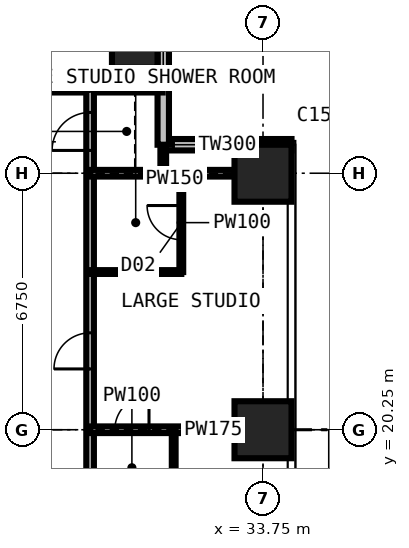
"""IFC4 building model, lengths in metres.
Left out: names, types, materials, properties, quantities, classifications, styles, units other than length and angle.
Written with IfcOpenShell. Run it as: python <this file> out.ifc"""

import sys

from ifc_helpers import new_model, si_unit, direction, frame, frame_2d, origin, origin_2d, place, context, subcontext, project, spatial, rectangle, extrude, element, fill, save


model = new_model("IFC4")
c1 = context("Model", 3, precision=1e-05, world=origin(), true_north=direction((0.0, 1.0)))
c2 = subcontext(c1, "Body", "Model", "MODEL_VIEW")
j1 = project(units=[si_unit("LENGTHUNIT", "METRE"), si_unit("PLANEANGLEUNIT", "RADIAN")], contexts=[c1])
p1 = place(None, origin())
s1 = spatial("IfcSite", under=j1, at=p1, CompositionType="ELEMENT")
p2 = place(p1, origin())
s2 = spatial("IfcBuilding", under=s1, at=p2, CompositionType="ELEMENT")
p3 = place(p2, frame((0.0, 0.0, 153.0)))
s3 = spatial("IfcBuildingStorey", under=s2, at=p3, CompositionType="ELEMENT", Elevation=153.0)
p4 = place(p3, frame((30.375, 30.375, 0.0), z_axis=(0.0, 0.0, 1.0), x_axis=(1.0, 0.0, 0.0)))
e1 = element("IfcColumn", 1, at=p4, inside=s3, PredefinedType="COLUMN", context=c2, shape_type="SweptSolid", body=[
    extrude(rectangle(XDim=1.2, YDim=1.2, at=origin_2d()), origin(), (0.0, 0.0, 1.0), 3.6),
])
for number, where, z_axis, x_axis in (
    (2, (33.75, 20.25, 0.0), (0.0, 0.0, 1.0), (1.0, 0.0, 0.0)),
    (3, (33.75, 27.0, 0.0), (0.0, 0.0, 1.0), (1.0, 0.0, 0.0)),
):
    element("IfcColumn", number, at=place(p3, frame(where, z_axis=z_axis, x_axis=x_axis)), inside=s3, PredefinedType="COLUMN", context=c2, shape_type="SweptSolid", body=[
        extrude(rectangle(XDim=1.5, YDim=1.5, at=origin_2d()), origin(), (0.0, 0.0, 1.0), 3.6),
    ])
p5 = place(p3, frame((34.5, 27.75, 0.0), z_axis=(0.0, 0.0, 1.0), x_axis=(-1.0, 0.0, 0.0)))
e4 = element("IfcWall", 4, at=p5, inside=s3, PredefinedType="SOLIDWALL", context=c2, shape_type="SweptSolid", body=[
    extrude(rectangle(XDim=3.375, YDim=0.3, at=frame_2d((1.688, 0.0))), origin(), (0.0, 0.0, 1.0), 3.375),
])
p6 = place(p5, frame((1.607, 0.0, 0.9)))
e5 = element("IfcOpeningElement", 5, at=p6, cuts=e4, PredefinedType="OPENING", context=c2, shape_type="SweptSolid", body=[
    extrude(rectangle(XDim=1.5, YDim=1.8, at=frame_2d((0.75, 0.9))), frame((0.0, 0.16, 0.0), z_axis=(0.0, -1.0, 0.0), x_axis=(1.0, 0.0, 0.0)), (0.0, 0.0, 1.0), 0.32),
])
p7 = place(p3, frame((31.125, 27.75, 0.0), z_axis=(0.0, 0.0, 1.0), x_axis=(0.0, 1.0, 0.0)))
e6 = element("IfcWall", 6, at=p7, inside=s3, PredefinedType="SOLIDWALL", context=c2, shape_type="SweptSolid", body=[
    extrude(rectangle(XDim=3.375, YDim=0.3, at=frame_2d((1.688, 0.0))), origin(), (0.0, 0.0, 1.0), 3.375),
])
p8 = place(p7, frame((1.663, 0.0, 0.9)))
e7 = element("IfcOpeningElement", 7, at=p8, cuts=e6, PredefinedType="OPENING", context=c2, shape_type="SweptSolid", body=[
    extrude(rectangle(XDim=1.5, YDim=1.8, at=frame_2d((0.75, 0.9))), frame((0.0, 0.16, 0.0), z_axis=(0.0, -1.0, 0.0), x_axis=(1.0, 0.0, 0.0)), (0.0, 0.0, 1.0), 0.32),
])
p9 = place(p3, frame((11.3, 29.2, 0.0), z_axis=(0.0, 0.0, 1.0), x_axis=(1.0, 0.0, 0.0)))
e8 = element("IfcWall", 8, at=p9, inside=s3, PredefinedType="PARTITIONING", context=c2, shape_type="SweptSolid", body=[
    extrude(rectangle(XDim=19.809, YDim=0.15, at=frame_2d((9.904, 0.0))), origin(), (0.0, 0.0, 1.0), 3.375),
])
p10 = place(p9, frame((12.9, 0.0, 0.0)))
e9 = element("IfcOpeningElement", 9, at=p10, cuts=e8, PredefinedType="OPENING", context=c2, shape_type="SweptSolid", body=[
    extrude(rectangle(XDim=1.0, YDim=2.2, at=frame_2d((0.5, 1.1))), frame((0.0, 0.085, 0.0), z_axis=(0.0, -1.0, 0.0), x_axis=(1.0, 0.0, 0.0)), (0.0, 0.0, 1.0), 0.17),
])
p11 = place(p9, frame((5.825, 0.0, 0.0)))
e10 = element("IfcOpeningElement", 10, at=p11, cuts=e8, PredefinedType="OPENING", context=c2, shape_type="SweptSolid", body=[
    extrude(rectangle(XDim=0.95, YDim=2.2, at=frame_2d((0.475, 1.1))), frame((0.0, 0.085, 0.0), z_axis=(0.0, -1.0, 0.0), x_axis=(1.0, 0.0, 0.0)), (0.0, 0.0, 1.0), 0.17),
])
p12 = place(p9, frame((0.6, 0.0, 0.0)))
e11 = element("IfcOpeningElement", 11, at=p12, cuts=e8, PredefinedType="OPENING", context=c2, shape_type="SweptSolid", body=[
    extrude(rectangle(XDim=1.0, YDim=2.2, at=frame_2d((0.5, 1.1))), frame((0.0, 0.085, 0.0), z_axis=(0.0, -1.0, 0.0), x_axis=(1.0, 0.0, 0.0)), (0.0, 0.0, 1.0), 0.17),
])
p13 = place(p3, frame((29.2, 11.3, 0.0), z_axis=(0.0, 0.0, 1.0), x_axis=(0.0, 1.0, 0.0)))
e12 = element("IfcWall", 12, at=p13, inside=s3, PredefinedType="PARTITIONING", context=c2, shape_type="SweptSolid", body=[
    extrude(rectangle(XDim=17.9, YDim=0.2, at=frame_2d((8.95, 0.0))), origin(), (0.0, 0.0, 1.0), 3.375),
])
p14 = place(p13, frame((10.55, 0.0, 0.0)))
e13 = element("IfcOpeningElement", 13, at=p14, cuts=e12, PredefinedType="OPENING", context=c2, shape_type="SweptSolid", body=[
    extrude(rectangle(XDim=0.95, YDim=2.2, at=frame_2d((0.475, 1.1))), frame((0.0, 0.11, 0.0), z_axis=(0.0, -1.0, 0.0), x_axis=(1.0, 0.0, 0.0)), (0.0, 0.0, 1.0), 0.22),
])
p15 = place(p13, frame((5.775, 0.0, 0.0)))
e14 = element("IfcOpeningElement", 14, at=p15, cuts=e12, PredefinedType="OPENING", context=c2, shape_type="SweptSolid", body=[
    extrude(rectangle(XDim=0.95, YDim=2.2, at=frame_2d((0.475, 1.1))), frame((0.0, 0.11, 0.0), z_axis=(0.0, -1.0, 0.0), x_axis=(1.0, 0.0, 0.0)), (0.0, 0.0, 1.0), 0.22),
])
p16 = place(p13, frame((16.3, 0.0, 0.0)))
e15 = element("IfcOpeningElement", 15, at=p16, cuts=e12, PredefinedType="OPENING", context=c2, shape_type="SweptSolid", body=[
    extrude(rectangle(XDim=1.0, YDim=2.2, at=frame_2d((0.5, 1.1))), frame((0.0, 0.11, 0.0), z_axis=(0.0, -1.0, 0.0), x_axis=(1.0, 0.0, 0.0)), (0.0, 0.0, 1.0), 0.22),
])
p17 = place(p3, frame((29.2, 20.25, 0.0), z_axis=(0.0, 0.0, 1.0), x_axis=(1.0, 0.0, 0.0)))
e16 = element("IfcWall", 16, at=p17, inside=s3, PredefinedType="PARTITIONING", context=c2, shape_type="SweptSolid", body=[
    extrude(rectangle(XDim=5.284, YDim=0.175, at=frame_2d((2.642, 0.0))), origin(), (0.0, 0.0, 1.0), 2.61),
])
p18 = place(p17, frame((0.65, 0.0, 0.0)))
e17 = element("IfcOpeningElement", 17, at=p18, cuts=e16, PredefinedType="OPENING", context=c2, shape_type="SweptSolid", body=[
    extrude(rectangle(XDim=0.9, YDim=2.2, at=frame_2d((0.45, 1.1))), frame((0.0, 0.097, 0.0), z_axis=(0.0, -1.0, 0.0), x_axis=(1.0, 0.0, 0.0)), (0.0, 0.0, 1.0), 0.195),
])
p19 = place(p3, frame((29.2, 24.4, 0.0), z_axis=(0.0, 0.0, 1.0), x_axis=(1.0, 0.0, 0.0)))
e18 = element("IfcWall", 18, at=p19, inside=s3, PredefinedType="PARTITIONING", context=c2, shape_type="SweptSolid", body=[
    extrude(rectangle(XDim=2.4, YDim=0.1, at=frame_2d((1.2, 0.0))), origin(), (0.0, 0.0, 1.0), 3.375),
])
p20 = place(p3, frame((29.2, 27.0, 0.0), z_axis=(0.0, 0.0, 1.0), x_axis=(1.0, 0.0, 0.0)))
e19 = element("IfcWall", 19, at=p20, inside=s3, PredefinedType="PARTITIONING", context=c2, shape_type="SweptSolid", body=[
    extrude(rectangle(XDim=5.284, YDim=0.175, at=frame_2d((2.642, 0.0))), origin(), (0.0, 0.0, 1.0), 2.806),
])
p21 = place(p3, frame((31.125, 27.0, 0.0), z_axis=(0.0, 0.0, 1.0), x_axis=(0.0, 1.0, 0.0)))
e20 = element("IfcWall", 20, at=p21, inside=s3, PredefinedType="PARTITIONING", context=c2, shape_type="SweptSolid", body=[
    extrude(rectangle(XDim=0.734, YDim=0.15, at=frame_2d((0.367, 0.0))), origin(), (0.0, 0.0, 1.0), 3.375),
])
p22 = place(p3, frame((31.4, 18.25, 0.0), z_axis=(0.0, 0.0, 1.0), x_axis=(0.0, 1.0, 0.0)))
e21 = element("IfcWall", 21, at=p22, inside=s3, PredefinedType="PARTITIONING", context=c2, shape_type="SweptSolid", body=[
    extrude(rectangle(XDim=2.0, YDim=0.1, at=frame_2d((1.0, 0.0))), origin(), (0.0, 0.0, 1.0), 3.375),
])
p23 = place(p3, frame((31.6, 24.4, 0.0), z_axis=(0.0, 0.0, 1.0), x_axis=(0.0, 1.0, 0.0)))
e22 = element("IfcWall", 22, at=p23, inside=s3, PredefinedType="PARTITIONING", context=c2, shape_type="SweptSolid", body=[
    extrude(rectangle(XDim=2.6, YDim=0.1, at=frame_2d((1.3, 0.0))), origin(), (0.0, 0.0, 1.0), 3.375),
])
p24 = place(p23, frame((0.85, 0.0, 0.0)))
e23 = element("IfcOpeningElement", 23, at=p24, cuts=e22, PredefinedType="OPENING", context=c2, shape_type="SweptSolid", body=[
    extrude(rectangle(XDim=0.9, YDim=2.2, at=frame_2d((0.45, 1.1))), frame((0.0, 0.06, 0.0), z_axis=(0.0, -1.0, 0.0), x_axis=(1.0, 0.0, 0.0)), (0.0, 0.0, 1.0), 0.12),
])
p25 = place(p6, origin())
e24 = element("IfcWindow", 24, at=p25, inside=s3, PartitioningType="SINGLE_PANEL", PredefinedType="WINDOW", context=c2, shape_type="SweptSolid", body=[
    extrude(rectangle(XDim=1.5, YDim=1.8, at=frame_2d((0.75, 0.9))), frame((0.0, 0.03, 0.0), z_axis=(0.0, -1.0, 0.0), x_axis=(1.0, 0.0, 0.0)), (0.0, 0.0, 1.0), 0.06),
])
fill(e5, e24)
p26 = place(p8, origin())
e25 = element("IfcWindow", 25, at=p26, inside=s3, PartitioningType="SINGLE_PANEL", PredefinedType="WINDOW", context=c2, shape_type="SweptSolid", body=[
    extrude(rectangle(XDim=1.5, YDim=1.8, at=frame_2d((0.75, 0.9))), frame((0.0, 0.03, 0.0), z_axis=(0.0, -1.0, 0.0), x_axis=(1.0, 0.0, 0.0)), (0.0, 0.0, 1.0), 0.06),
])
fill(e7, e25)
p27 = place(p14, origin())
e26 = element("IfcDoor", 26, at=p27, inside=s3, OperationType="SINGLE_SWING_LEFT", PredefinedType="DOOR", context=c2, shape_type="SweptSolid", body=[
    extrude(rectangle(XDim=0.95, YDim=2.2, at=frame_2d((0.475, 1.1))), frame((0.0, 0.025, 0.0), z_axis=(0.0, -1.0, 0.0), x_axis=(1.0, 0.0, 0.0)), (0.0, 0.0, 1.0), 0.05),
])
fill(e13, e26)
p28 = place(p24, origin())
e27 = element("IfcDoor", 27, at=p28, inside=s3, OperationType="SINGLE_SWING_RIGHT", PredefinedType="DOOR", context=c2, shape_type="SweptSolid", body=[
    extrude(rectangle(XDim=0.9, YDim=2.2, at=frame_2d((0.45, 1.1))), frame((0.0, 0.025, 0.0), z_axis=(0.0, -1.0, 0.0), x_axis=(1.0, 0.0, 0.0)), (0.0, 0.0, 1.0), 0.05),
])
fill(e23, e27)
p29 = place(p18, origin())
e28 = element("IfcDoor", 28, at=p29, inside=s3, OperationType="SINGLE_SWING_RIGHT", PredefinedType="DOOR", context=c2, shape_type="SweptSolid", body=[
    extrude(rectangle(XDim=0.9, YDim=2.2, at=frame_2d((0.45, 1.1))), frame((0.0, 0.025, 0.0), z_axis=(0.0, -1.0, 0.0), x_axis=(1.0, 0.0, 0.0)), (0.0, 0.0, 1.0), 0.05),
])
fill(e17, e28)
p30 = place(p16, origin())
e29 = element("IfcDoor", 29, at=p30, inside=s3, OperationType="SINGLE_SWING_LEFT", PredefinedType="DOOR", context=c2, shape_type="SweptSolid", body=[
    extrude(rectangle(XDim=1.0, YDim=2.2, at=frame_2d((0.5, 1.1))), frame((0.0, 0.025, 0.0), z_axis=(0.0, -1.0, 0.0), x_axis=(1.0, 0.0, 0.0)), (0.0, 0.0, 1.0), 0.05),
])
fill(e15, e29)
save(model, sys.argv[1])
